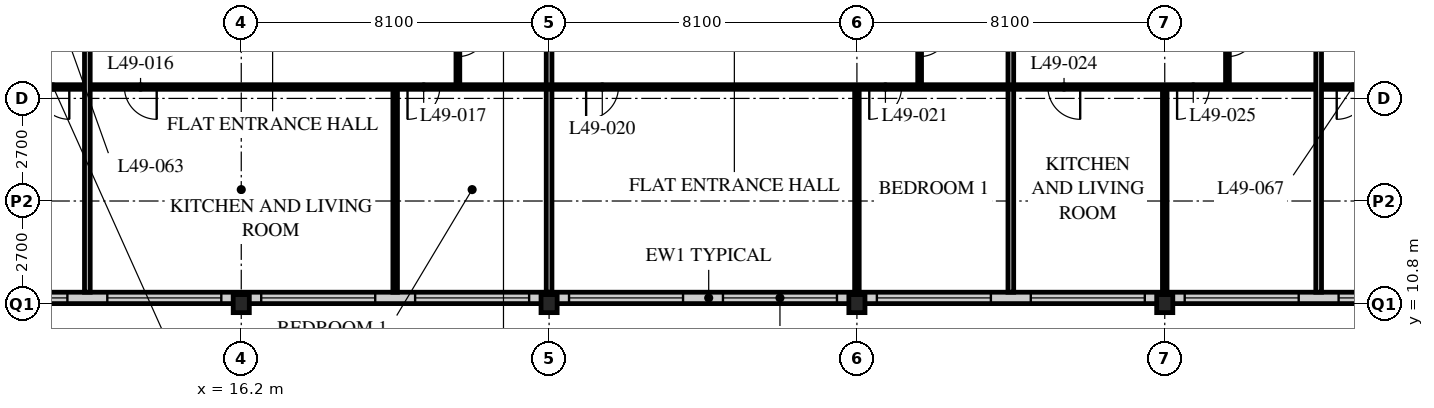
"""IFC4 building model, lengths in metres.
Left out: names, types, materials, properties, quantities, classifications, styles, units other than length and angle.
Written with IfcOpenShell. Run it as: python <this file> out.ifc"""

import sys

from ifc_helpers import new_model, si_unit, direction, frame, frame_2d, origin, origin_2d, place, context, subcontext, project, spatial, rectangle, i_section, extrude, element, fill, save


model = new_model("IFC4")
c1 = context("Model", 3, precision=1e-05, world=origin(), true_north=direction((0.0, 1.0)))
c2 = subcontext(c1, "Body", "Model", "MODEL_VIEW")
j1 = project(units=[si_unit("LENGTHUNIT", "METRE"), si_unit("PLANEANGLEUNIT", "RADIAN")], contexts=[c1])
p1 = place(None, origin())
s1 = spatial("IfcSite", under=j1, at=p1, CompositionType="ELEMENT")
p2 = place(p1, origin())
s2 = spatial("IfcBuilding", under=s1, at=p2, CompositionType="ELEMENT")
p3 = place(p2, frame((0.0, 0.0, 192.0)))
s3 = spatial("IfcBuildingStorey", under=s2, at=p3, CompositionType="ELEMENT", Elevation=192.0)
for number, where, z_axis, x_axis in (
    (1, (16.2, 10.8, 0.0), (0.0, 0.0, 1.0), (1.0, 0.0, 0.0)),
    (2, (24.3, 10.8, 0.0), (0.0, 0.0, 1.0), (1.0, 0.0, 0.0)),
    (3, (32.4, 10.8, 0.0), (0.0, 0.0, 1.0), (1.0, 0.0, 0.0)),
    (4, (40.5, 10.8, 0.0), (0.0, 0.0, 1.0), (1.0, 0.0, 0.0)),
):
    element("IfcColumn", number, at=place(p3, frame(where, z_axis=z_axis, x_axis=x_axis)), inside=s3, PredefinedType="COLUMN", context=c2, shape_type="SweptSolid", body=[
        extrude(i_section(OverallWidth=0.424, OverallDepth=0.475, WebThickness=0.048, FlangeThickness=0.077, FilletRadius=0.015, at=origin_2d()), origin(), (0.0, 0.0, 1.0), 3.6),
    ])
p4 = place(p3, frame((8.4, 10.95, 0.0), z_axis=(0.0, 0.0, 1.0), x_axis=(1.0, 0.0, 0.0)))
e5 = element("IfcWall", 5, at=p4, inside=s3, PredefinedType="SOLIDWALL", context=c2, shape_type="SweptSolid", body=[
    extrude(rectangle(XDim=40.2, YDim=0.3, at=frame_2d((20.1, 0.0))), origin(), (0.0, 0.0, 1.0), 3.39),
])
p5 = place(p4, frame((0.225, 0.0, 0.6)))
e6 = element("IfcOpeningElement", 6, at=p5, cuts=e5, PredefinedType="OPENING", context=c2, shape_type="SweptSolid", body=[
    extrude(rectangle(XDim=3.0, YDim=2.4, at=frame_2d((1.5, 1.2))), frame((0.0, 0.16, 0.0), z_axis=(0.0, -1.0, 0.0), x_axis=(1.0, 0.0, 0.0)), (0.0, 0.0, 1.0), 0.32),
])
p6 = place(p4, frame((4.275, 0.0, 0.6)))
e7 = element("IfcOpeningElement", 7, at=p6, cuts=e5, PredefinedType="OPENING", context=c2, shape_type="SweptSolid", body=[
    extrude(rectangle(XDim=3.0, YDim=2.4, at=frame_2d((1.5, 1.2))), frame((0.0, 0.16, 0.0), z_axis=(0.0, -1.0, 0.0), x_axis=(1.0, 0.0, 0.0)), (0.0, 0.0, 1.0), 0.32),
])
p7 = place(p4, frame((8.325, 0.0, 0.6)))
e8 = element("IfcOpeningElement", 8, at=p7, cuts=e5, PredefinedType="OPENING", context=c2, shape_type="SweptSolid", body=[
    extrude(rectangle(XDim=3.0, YDim=2.4, at=frame_2d((1.5, 1.2))), frame((0.0, 0.16, 0.0), z_axis=(0.0, -1.0, 0.0), x_axis=(1.0, 0.0, 0.0)), (0.0, 0.0, 1.0), 0.32),
])
p8 = place(p4, frame((12.375, 0.0, 0.6)))
e9 = element("IfcOpeningElement", 9, at=p8, cuts=e5, PredefinedType="OPENING", context=c2, shape_type="SweptSolid", body=[
    extrude(rectangle(XDim=3.0, YDim=2.4, at=frame_2d((1.5, 1.2))), frame((0.0, 0.16, 0.0), z_axis=(0.0, -1.0, 0.0), x_axis=(1.0, 0.0, 0.0)), (0.0, 0.0, 1.0), 0.32),
])
p9 = place(p4, frame((16.425, 0.0, 0.6)))
e10 = element("IfcOpeningElement", 10, at=p9, cuts=e5, PredefinedType="OPENING", context=c2, shape_type="SweptSolid", body=[
    extrude(rectangle(XDim=3.0, YDim=2.4, at=frame_2d((1.5, 1.2))), frame((0.0, 0.16, 0.0), z_axis=(0.0, -1.0, 0.0), x_axis=(1.0, 0.0, 0.0)), (0.0, 0.0, 1.0), 0.32),
])
p10 = place(p4, frame((20.475, 0.0, 0.6)))
e11 = element("IfcOpeningElement", 11, at=p10, cuts=e5, PredefinedType="OPENING", context=c2, shape_type="SweptSolid", body=[
    extrude(rectangle(XDim=3.0, YDim=2.4, at=frame_2d((1.5, 1.2))), frame((0.0, 0.16, 0.0), z_axis=(0.0, -1.0, 0.0), x_axis=(1.0, 0.0, 0.0)), (0.0, 0.0, 1.0), 0.32),
])
p11 = place(p4, frame((24.525, 0.0, 0.6)))
e12 = element("IfcOpeningElement", 12, at=p11, cuts=e5, PredefinedType="OPENING", context=c2, shape_type="SweptSolid", body=[
    extrude(rectangle(XDim=3.0, YDim=2.4, at=frame_2d((1.5, 1.2))), frame((0.0, 0.16, 0.0), z_axis=(0.0, -1.0, 0.0), x_axis=(1.0, 0.0, 0.0)), (0.0, 0.0, 1.0), 0.32),
])
p12 = place(p4, frame((28.575, 0.0, 0.6)))
e13 = element("IfcOpeningElement", 13, at=p12, cuts=e5, PredefinedType="OPENING", context=c2, shape_type="SweptSolid", body=[
    extrude(rectangle(XDim=3.0, YDim=2.4, at=frame_2d((1.5, 1.2))), frame((0.0, 0.16, 0.0), z_axis=(0.0, -1.0, 0.0), x_axis=(1.0, 0.0, 0.0)), (0.0, 0.0, 1.0), 0.32),
])
p13 = place(p4, frame((32.625, 0.0, 0.6)))
e14 = element("IfcOpeningElement", 14, at=p13, cuts=e5, PredefinedType="OPENING", context=c2, shape_type="SweptSolid", body=[
    extrude(rectangle(XDim=3.0, YDim=2.4, at=frame_2d((1.5, 1.2))), frame((0.0, 0.16, 0.0), z_axis=(0.0, -1.0, 0.0), x_axis=(1.0, 0.0, 0.0)), (0.0, 0.0, 1.0), 0.32),
])
p14 = place(p4, frame((36.675, 0.0, 0.6)))
e15 = element("IfcOpeningElement", 15, at=p14, cuts=e5, PredefinedType="OPENING", context=c2, shape_type="SweptSolid", body=[
    extrude(rectangle(XDim=3.0, YDim=2.4, at=frame_2d((1.5, 1.2))), frame((0.0, 0.16, 0.0), z_axis=(0.0, -1.0, 0.0), x_axis=(1.0, 0.0, 0.0)), (0.0, 0.0, 1.0), 0.32),
])
p15 = place(p3, frame((21.9, 18.9, 0.0), z_axis=(0.0, 0.0, 1.0), x_axis=(0.0, -1.0, 0.0)))
e16 = element("IfcWall", 16, at=p15, inside=s3, PredefinedType="PARTITIONING", context=c2, shape_type="SweptSolid", body=[
    extrude(rectangle(XDim=2.4, YDim=0.1, at=frame_2d((1.2, 0.0))), origin(), (0.0, 0.0, 1.0), 3.39),
])
p16 = place(p15, frame((0.8, 0.0, 0.0)))
e17 = element("IfcOpeningElement", 17, at=p16, cuts=e16, PredefinedType="OPENING", context=c2, shape_type="SweptSolid", body=[
    extrude(rectangle(XDim=0.8, YDim=2.1, at=frame_2d((0.4, 1.05))), frame((0.0, 0.06, 0.0), z_axis=(0.0, -1.0, 0.0), x_axis=(1.0, 0.0, 0.0)), (0.0, 0.0, 1.0), 0.12),
])
p17 = place(p3, frame((20.25, 16.5, 0.0), z_axis=(0.0, 0.0, 1.0), x_axis=(0.0, -1.0, 0.0)))
e18 = element("IfcWall", 18, at=p17, inside=s3, PredefinedType="PARTITIONING", context=c2, shape_type="SweptSolid", body=[
    extrude(rectangle(XDim=5.4, YDim=0.12, at=frame_2d((2.7, 0.0))), origin(), (0.0, 0.0, 1.0), 3.39),
])
p18 = place(p3, frame((24.3, 18.9, 0.0), z_axis=(0.0, 0.0, 1.0), x_axis=(0.0, -1.0, 0.0)))
e19 = element("IfcWall", 19, at=p18, inside=s3, PredefinedType="PARTITIONING", context=c2, shape_type="SweptSolid", body=[
    extrude(rectangle(XDim=7.8, YDim=0.15, at=frame_2d((3.9, 0.0))), origin(), (0.0, 0.0, 1.0), 2.778),
])
p19 = place(p3, frame((34.05, 18.9, 0.0), z_axis=(0.0, 0.0, 1.0), x_axis=(0.0, -1.0, 0.0)))
e20 = element("IfcWall", 20, at=p19, inside=s3, PredefinedType="PARTITIONING", context=c2, shape_type="SweptSolid", body=[
    extrude(rectangle(XDim=2.4, YDim=0.1, at=frame_2d((1.2, 0.0))), origin(), (0.0, 0.0, 1.0), 3.39),
])
p20 = place(p19, frame((0.8, 0.0, 0.0)))
e21 = element("IfcOpeningElement", 21, at=p20, cuts=e20, PredefinedType="OPENING", context=c2, shape_type="SweptSolid", body=[
    extrude(rectangle(XDim=0.8, YDim=2.1, at=frame_2d((0.4, 1.05))), frame((0.0, 0.06, 0.0), z_axis=(0.0, -1.0, 0.0), x_axis=(1.0, 0.0, 0.0)), (0.0, 0.0, 1.0), 0.12),
])
p21 = place(p3, frame((32.4, 16.5, 0.0), z_axis=(0.0, 0.0, 1.0), x_axis=(0.0, -1.0, 0.0)))
e22 = element("IfcWall", 22, at=p21, inside=s3, PredefinedType="PARTITIONING", context=c2, shape_type="SweptSolid", body=[
    extrude(rectangle(XDim=5.4, YDim=0.12, at=frame_2d((2.7, 0.0))), origin(), (0.0, 0.0, 1.0), 2.778),
])
p22 = place(p3, frame((36.45, 18.9, 0.0), z_axis=(0.0, 0.0, 1.0), x_axis=(0.0, -1.0, 0.0)))
e23 = element("IfcWall", 23, at=p22, inside=s3, PredefinedType="PARTITIONING", context=c2, shape_type="SweptSolid", body=[
    extrude(rectangle(XDim=7.8, YDim=0.15, at=frame_2d((3.9, 0.0))), origin(), (0.0, 0.0, 1.0), 3.39),
])
p23 = place(p3, frame((42.15, 18.9, 0.0), z_axis=(0.0, 0.0, 1.0), x_axis=(0.0, -1.0, 0.0)))
e24 = element("IfcWall", 24, at=p23, inside=s3, PredefinedType="PARTITIONING", context=c2, shape_type="SweptSolid", body=[
    extrude(rectangle(XDim=2.4, YDim=0.1, at=frame_2d((1.2, 0.0))), origin(), (0.0, 0.0, 1.0), 3.39),
])
p24 = place(p23, frame((0.8, 0.0, 0.0)))
e25 = element("IfcOpeningElement", 25, at=p24, cuts=e24, PredefinedType="OPENING", context=c2, shape_type="SweptSolid", body=[
    extrude(rectangle(XDim=0.8, YDim=2.1, at=frame_2d((0.4, 1.05))), frame((0.0, 0.06, 0.0), z_axis=(0.0, -1.0, 0.0), x_axis=(1.0, 0.0, 0.0)), (0.0, 0.0, 1.0), 0.12),
])
p25 = place(p3, frame((40.5, 16.5, 0.0), z_axis=(0.0, 0.0, 1.0), x_axis=(0.0, -1.0, 0.0)))
e26 = element("IfcWall", 26, at=p25, inside=s3, PredefinedType="PARTITIONING", context=c2, shape_type="SweptSolid", body=[
    extrude(rectangle(XDim=5.4, YDim=0.12, at=frame_2d((2.7, 0.0))), origin(), (0.0, 0.0, 1.0), 2.778),
])
p26 = place(p3, frame((8.1, 16.5, 0.0), z_axis=(0.0, 0.0, 1.0), x_axis=(1.0, 0.0, 0.0)))
e27 = element("IfcWall", 27, at=p26, inside=s3, PredefinedType="PARTITIONING", context=c2, shape_type="SweptSolid", body=[
    extrude(rectangle(XDim=40.5, YDim=0.12, at=frame_2d((20.25, 0.0))), origin(), (0.0, 0.0, 1.0), 3.39),
])
p27 = place(p26, frame((5.025, 0.0, 0.0)))
e28 = element("IfcOpeningElement", 28, at=p27, cuts=e27, PredefinedType="OPENING", context=c2, shape_type="SweptSolid", body=[
    extrude(rectangle(XDim=0.85, YDim=2.1, at=frame_2d((0.425, 1.05))), frame((0.0, 0.07, 0.0), z_axis=(0.0, -1.0, 0.0), x_axis=(1.0, 0.0, 0.0)), (0.0, 0.0, 1.0), 0.14),
])
p28 = place(p26, frame((12.475, 0.0, 0.0)))
e29 = element("IfcOpeningElement", 29, at=p28, cuts=e27, PredefinedType="OPENING", context=c2, shape_type="SweptSolid", body=[
    extrude(rectangle(XDim=0.85, YDim=2.1, at=frame_2d((0.425, 1.05))), frame((0.0, 0.07, 0.0), z_axis=(0.0, -1.0, 0.0), x_axis=(1.0, 0.0, 0.0)), (0.0, 0.0, 1.0), 0.14),
])
p29 = place(p26, frame((17.175, 0.0, 0.0)))
e30 = element("IfcOpeningElement", 30, at=p29, cuts=e27, PredefinedType="OPENING", context=c2, shape_type="SweptSolid", body=[
    extrude(rectangle(XDim=0.85, YDim=2.1, at=frame_2d((0.425, 1.05))), frame((0.0, 0.07, 0.0), z_axis=(0.0, -1.0, 0.0), x_axis=(1.0, 0.0, 0.0)), (0.0, 0.0, 1.0), 0.14),
])
p30 = place(p26, frame((24.625, 0.0, 0.0)))
e31 = element("IfcOpeningElement", 31, at=p30, cuts=e27, PredefinedType="OPENING", context=c2, shape_type="SweptSolid", body=[
    extrude(rectangle(XDim=0.85, YDim=2.1, at=frame_2d((0.425, 1.05))), frame((0.0, 0.07, 0.0), z_axis=(0.0, -1.0, 0.0), x_axis=(1.0, 0.0, 0.0)), (0.0, 0.0, 1.0), 0.14),
])
p31 = place(p26, frame((29.325, 0.0, 0.0)))
e32 = element("IfcOpeningElement", 32, at=p31, cuts=e27, PredefinedType="OPENING", context=c2, shape_type="SweptSolid", body=[
    extrude(rectangle(XDim=0.85, YDim=2.1, at=frame_2d((0.425, 1.05))), frame((0.0, 0.07, 0.0), z_axis=(0.0, -1.0, 0.0), x_axis=(1.0, 0.0, 0.0)), (0.0, 0.0, 1.0), 0.14),
])
p32 = place(p26, frame((32.725, 0.0, 0.0)))
e33 = element("IfcOpeningElement", 33, at=p32, cuts=e27, PredefinedType="OPENING", context=c2, shape_type="SweptSolid", body=[
    extrude(rectangle(XDim=0.85, YDim=2.1, at=frame_2d((0.425, 1.05))), frame((0.0, 0.07, 0.0), z_axis=(0.0, -1.0, 0.0), x_axis=(1.0, 0.0, 0.0)), (0.0, 0.0, 1.0), 0.14),
])
p33 = place(p26, frame((2.725, 0.0, 0.0)))
e34 = element("IfcOpeningElement", 34, at=p33, cuts=e27, PredefinedType="OPENING", context=c2, shape_type="SweptSolid", body=[
    extrude(rectangle(XDim=0.85, YDim=2.1, at=frame_2d((0.425, 1.05))), frame((0.0, 0.07, 0.0), z_axis=(0.0, -1.0, 0.0), x_axis=(1.0, 0.0, 0.0)), (0.0, 0.0, 1.0), 0.14),
])
p34 = place(p26, frame((36.925, 0.0, 0.0)))
e35 = element("IfcOpeningElement", 35, at=p34, cuts=e27, PredefinedType="OPENING", context=c2, shape_type="SweptSolid", body=[
    extrude(rectangle(XDim=0.85, YDim=2.1, at=frame_2d((0.425, 1.05))), frame((0.0, 0.07, 0.0), z_axis=(0.0, -1.0, 0.0), x_axis=(1.0, 0.0, 0.0)), (0.0, 0.0, 1.0), 0.14),
])
for number, where, z_axis, x_axis in (
    (36, (12.15, 18.9, 0.0), (0.0, 0.0, 1.0), (0.0, -1.0, 0.0)),
    (37, (44.55, 18.9, 0.0), (0.0, 0.0, 1.0), (0.0, -1.0, 0.0)),
):
    element("IfcWall", number, at=place(p3, frame(where, z_axis=z_axis, x_axis=x_axis)), inside=s3, PredefinedType="PARTITIONING", context=c2, shape_type="SweptSolid", body=[
        extrude(rectangle(XDim=7.8, YDim=0.15, at=frame_2d((3.9, 0.0))), origin(), (0.0, 0.0, 1.0), 3.39),
    ])
p35 = place(p5, origin())
e38 = element("IfcWindow", 38, at=p35, inside=s3, PartitioningType="SINGLE_PANEL", PredefinedType="WINDOW", context=c2, shape_type="SweptSolid", body=[
    extrude(rectangle(XDim=3.0, YDim=2.4, at=frame_2d((1.5, 1.2))), frame((0.0, 0.03, 0.0), z_axis=(0.0, -1.0, 0.0), x_axis=(1.0, 0.0, 0.0)), (0.0, 0.0, 1.0), 0.06),
])
fill(e6, e38)
p36 = place(p6, origin())
e39 = element("IfcWindow", 39, at=p36, inside=s3, PartitioningType="SINGLE_PANEL", PredefinedType="WINDOW", context=c2, shape_type="SweptSolid", body=[
    extrude(rectangle(XDim=3.0, YDim=2.4, at=frame_2d((1.5, 1.2))), frame((0.0, 0.03, 0.0), z_axis=(0.0, -1.0, 0.0), x_axis=(1.0, 0.0, 0.0)), (0.0, 0.0, 1.0), 0.06),
])
fill(e7, e39)
p37 = place(p7, origin())
e40 = element("IfcWindow", 40, at=p37, inside=s3, PartitioningType="SINGLE_PANEL", PredefinedType="WINDOW", context=c2, shape_type="SweptSolid", body=[
    extrude(rectangle(XDim=3.0, YDim=2.4, at=frame_2d((1.5, 1.2))), frame((0.0, 0.03, 0.0), z_axis=(0.0, -1.0, 0.0), x_axis=(1.0, 0.0, 0.0)), (0.0, 0.0, 1.0), 0.06),
])
fill(e8, e40)
p38 = place(p8, origin())
e41 = element("IfcWindow", 41, at=p38, inside=s3, PartitioningType="SINGLE_PANEL", PredefinedType="WINDOW", context=c2, shape_type="SweptSolid", body=[
    extrude(rectangle(XDim=3.0, YDim=2.4, at=frame_2d((1.5, 1.2))), frame((0.0, 0.03, 0.0), z_axis=(0.0, -1.0, 0.0), x_axis=(1.0, 0.0, 0.0)), (0.0, 0.0, 1.0), 0.06),
])
fill(e9, e41)
p39 = place(p9, origin())
e42 = element("IfcWindow", 42, at=p39, inside=s3, PartitioningType="SINGLE_PANEL", PredefinedType="WINDOW", context=c2, shape_type="SweptSolid", body=[
    extrude(rectangle(XDim=3.0, YDim=2.4, at=frame_2d((1.5, 1.2))), frame((0.0, 0.03, 0.0), z_axis=(0.0, -1.0, 0.0), x_axis=(1.0, 0.0, 0.0)), (0.0, 0.0, 1.0), 0.06),
])
fill(e10, e42)
p40 = place(p10, origin())
e43 = element("IfcWindow", 43, at=p40, inside=s3, PartitioningType="SINGLE_PANEL", PredefinedType="WINDOW", context=c2, shape_type="SweptSolid", body=[
    extrude(rectangle(XDim=3.0, YDim=2.4, at=frame_2d((1.5, 1.2))), frame((0.0, 0.03, 0.0), z_axis=(0.0, -1.0, 0.0), x_axis=(1.0, 0.0, 0.0)), (0.0, 0.0, 1.0), 0.06),
])
fill(e11, e43)
p41 = place(p11, origin())
e44 = element("IfcWindow", 44, at=p41, inside=s3, PartitioningType="SINGLE_PANEL", PredefinedType="WINDOW", context=c2, shape_type="SweptSolid", body=[
    extrude(rectangle(XDim=3.0, YDim=2.4, at=frame_2d((1.5, 1.2))), frame((0.0, 0.03, 0.0), z_axis=(0.0, -1.0, 0.0), x_axis=(1.0, 0.0, 0.0)), (0.0, 0.0, 1.0), 0.06),
])
fill(e12, e44)
p42 = place(p12, origin())
e45 = element("IfcWindow", 45, at=p42, inside=s3, PartitioningType="SINGLE_PANEL", PredefinedType="WINDOW", context=c2, shape_type="SweptSolid", body=[
    extrude(rectangle(XDim=3.0, YDim=2.4, at=frame_2d((1.5, 1.2))), frame((0.0, 0.03, 0.0), z_axis=(0.0, -1.0, 0.0), x_axis=(1.0, 0.0, 0.0)), (0.0, 0.0, 1.0), 0.06),
])
fill(e13, e45)
p43 = place(p13, origin())
e46 = element("IfcWindow", 46, at=p43, inside=s3, PartitioningType="SINGLE_PANEL", PredefinedType="WINDOW", context=c2, shape_type="SweptSolid", body=[
    extrude(rectangle(XDim=3.0, YDim=2.4, at=frame_2d((1.5, 1.2))), frame((0.0, 0.03, 0.0), z_axis=(0.0, -1.0, 0.0), x_axis=(1.0, 0.0, 0.0)), (0.0, 0.0, 1.0), 0.06),
])
fill(e14, e46)
p44 = place(p14, origin())
e47 = element("IfcWindow", 47, at=p44, inside=s3, PartitioningType="SINGLE_PANEL", PredefinedType="WINDOW", context=c2, shape_type="SweptSolid", body=[
    extrude(rectangle(XDim=3.0, YDim=2.4, at=frame_2d((1.5, 1.2))), frame((0.0, 0.03, 0.0), z_axis=(0.0, -1.0, 0.0), x_axis=(1.0, 0.0, 0.0)), (0.0, 0.0, 1.0), 0.06),
])
fill(e15, e47)
p45 = place(p16, origin())
e48 = element("IfcDoor", 48, at=p45, inside=s3, OperationType="SINGLE_SWING_LEFT", PredefinedType="DOOR", context=c2, shape_type="SweptSolid", body=[
    extrude(rectangle(XDim=0.8, YDim=2.1, at=frame_2d((0.4, 1.05))), frame((0.0, 0.025, 0.0), z_axis=(0.0, -1.0, 0.0), x_axis=(1.0, 0.0, 0.0)), (0.0, 0.0, 1.0), 0.05),
])
fill(e17, e48)
p46 = place(p27, origin())
e49 = element("IfcDoor", 49, at=p46, inside=s3, OperationType="SINGLE_SWING_LEFT", PredefinedType="DOOR", context=c2, shape_type="SweptSolid", body=[
    extrude(rectangle(XDim=0.85, YDim=2.1, at=frame_2d((0.425, 1.05))), frame((0.0, 0.025, 0.0), z_axis=(0.0, -1.0, 0.0), x_axis=(1.0, 0.0, 0.0)), (0.0, 0.0, 1.0), 0.05),
])
fill(e28, e49)
p47 = place(p28, origin())
e50 = element("IfcDoor", 50, at=p47, inside=s3, OperationType="SINGLE_SWING_RIGHT", PredefinedType="DOOR", context=c2, shape_type="SweptSolid", body=[
    extrude(rectangle(XDim=0.85, YDim=2.1, at=frame_2d((0.425, 1.05))), frame((0.0, 0.025, 0.0), z_axis=(0.0, -1.0, 0.0), x_axis=(1.0, 0.0, 0.0)), (0.0, 0.0, 1.0), 0.05),
])
fill(e29, e50)
p48 = place(p20, origin())
e51 = element("IfcDoor", 51, at=p48, inside=s3, OperationType="SINGLE_SWING_LEFT", PredefinedType="DOOR", context=c2, shape_type="SweptSolid", body=[
    extrude(rectangle(XDim=0.8, YDim=2.1, at=frame_2d((0.4, 1.05))), frame((0.0, 0.025, 0.0), z_axis=(0.0, -1.0, 0.0), x_axis=(1.0, 0.0, 0.0)), (0.0, 0.0, 1.0), 0.05),
])
fill(e21, e51)
p49 = place(p29, origin())
e52 = element("IfcDoor", 52, at=p49, inside=s3, OperationType="SINGLE_SWING_RIGHT", PredefinedType="DOOR", context=c2, shape_type="SweptSolid", body=[
    extrude(rectangle(XDim=0.85, YDim=2.1, at=frame_2d((0.425, 1.05))), frame((0.0, 0.025, 0.0), z_axis=(0.0, -1.0, 0.0), x_axis=(1.0, 0.0, 0.0)), (0.0, 0.0, 1.0), 0.05),
])
fill(e30, e52)
p50 = place(p30, origin())
e53 = element("IfcDoor", 53, at=p50, inside=s3, OperationType="SINGLE_SWING_RIGHT", PredefinedType="DOOR", context=c2, shape_type="SweptSolid", body=[
    extrude(rectangle(XDim=0.85, YDim=2.1, at=frame_2d((0.425, 1.05))), frame((0.0, 0.025, 0.0), z_axis=(0.0, -1.0, 0.0), x_axis=(1.0, 0.0, 0.0)), (0.0, 0.0, 1.0), 0.05),
])
fill(e31, e53)
p51 = place(p24, origin())
e54 = element("IfcDoor", 54, at=p51, inside=s3, OperationType="SINGLE_SWING_LEFT", PredefinedType="DOOR", context=c2, shape_type="SweptSolid", body=[
    extrude(rectangle(XDim=0.8, YDim=2.1, at=frame_2d((0.4, 1.05))), frame((0.0, 0.025, 0.0), z_axis=(0.0, -1.0, 0.0), x_axis=(1.0, 0.0, 0.0)), (0.0, 0.0, 1.0), 0.05),
])
fill(e25, e54)
p52 = place(p31, origin())
e55 = element("IfcDoor", 55, at=p52, inside=s3, OperationType="SINGLE_SWING_LEFT", PredefinedType="DOOR", context=c2, shape_type="SweptSolid", body=[
    extrude(rectangle(XDim=0.85, YDim=2.1, at=frame_2d((0.425, 1.05))), frame((0.0, 0.025, 0.0), z_axis=(0.0, -1.0, 0.0), x_axis=(1.0, 0.0, 0.0)), (0.0, 0.0, 1.0), 0.05),
])
fill(e32, e55)
p53 = place(p32, origin())
e56 = element("IfcDoor", 56, at=p53, inside=s3, OperationType="SINGLE_SWING_RIGHT", PredefinedType="DOOR", context=c2, shape_type="SweptSolid", body=[
    extrude(rectangle(XDim=0.85, YDim=2.1, at=frame_2d((0.425, 1.05))), frame((0.0, 0.025, 0.0), z_axis=(0.0, -1.0, 0.0), x_axis=(1.0, 0.0, 0.0)), (0.0, 0.0, 1.0), 0.05),
])
fill(e33, e56)
p54 = place(p33, origin())
e57 = element("IfcDoor", 57, at=p54, inside=s3, OperationType="SINGLE_SWING_LEFT", PredefinedType="DOOR", context=c2, shape_type="SweptSolid", body=[
    extrude(rectangle(XDim=0.85, YDim=2.1, at=frame_2d((0.425, 1.05))), frame((0.0, 0.025, 0.0), z_axis=(0.0, -1.0, 0.0), x_axis=(1.0, 0.0, 0.0)), (0.0, 0.0, 1.0), 0.05),
])
fill(e34, e57)
p55 = place(p34, origin())
e58 = element("IfcDoor", 58, at=p55, inside=s3, OperationType="SINGLE_SWING_RIGHT", PredefinedType="DOOR", context=c2, shape_type="SweptSolid", body=[
    extrude(rectangle(XDim=0.85, YDim=2.1, at=frame_2d((0.425, 1.05))), frame((0.0, 0.025, 0.0), z_axis=(0.0, -1.0, 0.0), x_axis=(1.0, 0.0, 0.0)), (0.0, 0.0, 1.0), 0.05),
])
fill(e35, e58)
save(model, sys.argv[1])
